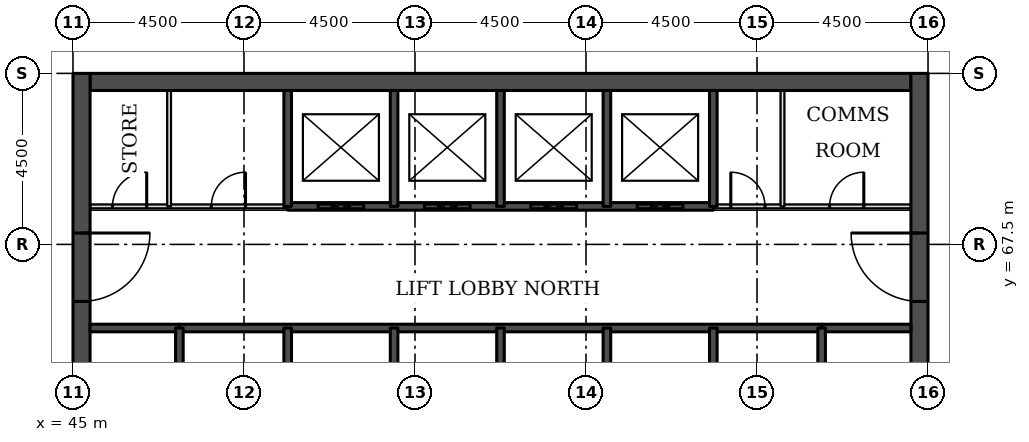
"""IFC4 building model, lengths in metres.
Left out: names, types, materials, properties, quantities, classifications, styles, units other than length and angle.
Written with IfcOpenShell. Run it as: python <this file> out.ifc"""

import sys

from ifc_helpers import new_model, si_unit, direction, frame, frame_2d, origin, place, context, subcontext, project, spatial, rectangle, extrude, element, fill, save


model = new_model("IFC4")
c1 = context("Model", 3, precision=1e-05, world=origin(), true_north=direction((0.0, 1.0)))
c2 = subcontext(c1, "Body", "Model", "MODEL_VIEW")
j1 = project(units=[si_unit("LENGTHUNIT", "METRE"), si_unit("PLANEANGLEUNIT", "RADIAN")], contexts=[c1])
p1 = place(None, origin())
s1 = spatial("IfcSite", under=j1, at=p1, CompositionType="ELEMENT")
p2 = place(p1, origin())
s2 = spatial("IfcBuilding", under=s1, at=p2, CompositionType="ELEMENT")
p3 = place(p2, frame((0.0, 0.0, 97.4)))
s3 = spatial("IfcBuildingStorey", under=s2, at=p3, CompositionType="ELEMENT", Elevation=97.4)
p4 = place(p3, frame((45.45, 71.775, 0.0), z_axis=(0.0, 0.0, 1.0), x_axis=(1.0, 0.0, 0.0)))
e1 = element("IfcWall", 1, at=p4, inside=s3, PredefinedType="SHEAR", context=c2, shape_type="SweptSolid", body=[
    extrude(rectangle(XDim=21.6, YDim=0.45, at=frame_2d((10.8, 0.0))), origin(), (0.0, 0.0, 1.0), 3.7),
])
p5 = place(p3, frame((45.225, 49.5, 0.0), z_axis=(0.0, 0.0, 1.0), x_axis=(0.0, 1.0, 0.0)))
e2 = element("IfcWall", 2, at=p5, inside=s3, PredefinedType="SHEAR", context=c2, shape_type="SweptSolid", body=[
    extrude(rectangle(XDim=22.5, YDim=0.45, at=frame_2d((11.25, 0.0))), origin(), (0.0, 0.0, 1.0), 3.7),
])
p6 = place(p5, frame((4.2, 0.0, 0.0)))
e3 = element("IfcOpeningElement", 3, at=p6, cuts=e2, PredefinedType="OPENING", context=c2, shape_type="SweptSolid", body=[
    extrude(rectangle(XDim=1.8, YDim=2.1, at=frame_2d((0.9, 1.05))), frame((0.0, 0.235, 0.0), z_axis=(0.0, -1.0, 0.0), x_axis=(1.0, 0.0, 0.0)), (0.0, 0.0, 1.0), 0.47),
])
p7 = place(p5, frame((6.9, 0.0, 0.0)))
e4 = element("IfcOpeningElement", 4, at=p7, cuts=e2, PredefinedType="OPENING", context=c2, shape_type="SweptSolid", body=[
    extrude(rectangle(XDim=1.1, YDim=2.1, at=frame_2d((0.55, 1.05))), frame((0.0, 0.235, 0.0), z_axis=(0.0, -1.0, 0.0), x_axis=(1.0, 0.0, 0.0)), (0.0, 0.0, 1.0), 0.47),
])
p8 = place(p5, frame((13.6, 0.0, 0.0)))
e5 = element("IfcOpeningElement", 5, at=p8, cuts=e2, PredefinedType="OPENING", context=c2, shape_type="SweptSolid", body=[
    extrude(rectangle(XDim=1.1, YDim=2.1, at=frame_2d((0.55, 1.05))), frame((0.0, 0.235, 0.0), z_axis=(0.0, -1.0, 0.0), x_axis=(1.0, 0.0, 0.0)), (0.0, 0.0, 1.0), 0.47),
])
p9 = place(p5, frame((16.5, 0.0, 0.0)))
e6 = element("IfcOpeningElement", 6, at=p9, cuts=e2, PredefinedType="OPENING", context=c2, shape_type="SweptSolid", body=[
    extrude(rectangle(XDim=1.8, YDim=2.1, at=frame_2d((0.9, 1.05))), frame((0.0, 0.235, 0.0), z_axis=(0.0, -1.0, 0.0), x_axis=(1.0, 0.0, 0.0)), (0.0, 0.0, 1.0), 0.47),
])
p10 = place(p3, frame((67.275, 49.5, 0.0), z_axis=(0.0, 0.0, 1.0), x_axis=(0.0, 1.0, 0.0)))
e7 = element("IfcWall", 7, at=p10, inside=s3, PredefinedType="SHEAR", context=c2, shape_type="SweptSolid", body=[
    extrude(rectangle(XDim=22.5, YDim=0.45, at=frame_2d((11.25, 0.0))), origin(), (0.0, 0.0, 1.0), 3.7),
])
p11 = place(p10, frame((4.2, 0.0, 0.0)))
e8 = element("IfcOpeningElement", 8, at=p11, cuts=e7, PredefinedType="OPENING", context=c2, shape_type="SweptSolid", body=[
    extrude(rectangle(XDim=1.8, YDim=2.1, at=frame_2d((0.9, 1.05))), frame((0.0, 0.235, 0.0), z_axis=(0.0, -1.0, 0.0), x_axis=(1.0, 0.0, 0.0)), (0.0, 0.0, 1.0), 0.47),
])
p12 = place(p10, frame((6.9, 0.0, 0.0)))
e9 = element("IfcOpeningElement", 9, at=p12, cuts=e7, PredefinedType="OPENING", context=c2, shape_type="SweptSolid", body=[
    extrude(rectangle(XDim=1.1, YDim=2.1, at=frame_2d((0.55, 1.05))), frame((0.0, 0.235, 0.0), z_axis=(0.0, -1.0, 0.0), x_axis=(1.0, 0.0, 0.0)), (0.0, 0.0, 1.0), 0.47),
])
p13 = place(p10, frame((13.6, 0.0, 0.0)))
e10 = element("IfcOpeningElement", 10, at=p13, cuts=e7, PredefinedType="OPENING", context=c2, shape_type="SweptSolid", body=[
    extrude(rectangle(XDim=1.1, YDim=2.1, at=frame_2d((0.55, 1.05))), frame((0.0, 0.235, 0.0), z_axis=(0.0, -1.0, 0.0), x_axis=(1.0, 0.0, 0.0)), (0.0, 0.0, 1.0), 0.47),
])
p14 = place(p10, frame((16.5, 0.0, 0.0)))
e11 = element("IfcOpeningElement", 11, at=p14, cuts=e7, PredefinedType="OPENING", context=c2, shape_type="SweptSolid", body=[
    extrude(rectangle(XDim=1.8, YDim=2.1, at=frame_2d((0.9, 1.05))), frame((0.0, 0.235, 0.0), z_axis=(0.0, -1.0, 0.0), x_axis=(1.0, 0.0, 0.0)), (0.0, 0.0, 1.0), 0.47),
])
for number, where, z_axis, x_axis in (
    (12, (45.45, 65.3, 0.0), (0.0, 0.0, 1.0), (1.0, 0.0, 0.0)),
    (13, (64.7, 65.3, 0.0), (0.0, 0.0, 1.0), (1.0, 0.0, 0.0)),
):
    element("IfcWall", number, at=place(p3, frame(where, z_axis=z_axis, x_axis=x_axis)), inside=s3, PredefinedType="SOLIDWALL", context=c2, shape_type="SweptSolid", body=[
        extrude(rectangle(XDim=2.35, YDim=0.2, at=frame_2d((1.175, 0.0))), origin(), (0.0, 0.0, 1.0), 3.55),
    ])
p15 = place(p3, frame((47.8, 65.3, 0.0), z_axis=(0.0, 0.0, 1.0), x_axis=(1.0, 0.0, 0.0)))
e14 = element("IfcWall", 14, at=p15, inside=s3, PredefinedType="SOLIDWALL", context=c2, shape_type="SweptSolid", body=[
    extrude(rectangle(XDim=16.9, YDim=0.2, at=frame_2d((8.45, 0.0))), origin(), (0.0, 0.0, 1.0), 3.55),
])
p16 = place(p3, frame((45.45, 68.5, 0.0), z_axis=(0.0, 0.0, 1.0), x_axis=(1.0, 0.0, 0.0)))
e15 = element("IfcWall", 15, at=p16, inside=s3, PredefinedType="PARTITIONING", context=c2, shape_type="SweptSolid", body=[
    extrude(rectangle(XDim=5.2, YDim=0.1, at=frame_2d((2.6, 0.0))), origin(), (0.0, 0.0, 1.0), 3.55),
])
p17 = place(p16, frame((0.59, 0.0, 0.0)))
e16 = element("IfcOpeningElement", 16, at=p17, cuts=e15, PredefinedType="OPENING", context=c2, shape_type="SweptSolid", body=[
    extrude(rectangle(XDim=0.9, YDim=2.1, at=frame_2d((0.45, 1.05))), frame((0.0, 0.06, 0.0), z_axis=(0.0, -1.0, 0.0), x_axis=(1.0, 0.0, 0.0)), (0.0, 0.0, 1.0), 0.12),
])
p18 = place(p16, frame((3.19, 0.0, 0.0)))
e17 = element("IfcOpeningElement", 17, at=p18, cuts=e15, PredefinedType="OPENING", context=c2, shape_type="SweptSolid", body=[
    extrude(rectangle(XDim=0.9, YDim=2.1, at=frame_2d((0.45, 1.05))), frame((0.0, 0.06, 0.0), z_axis=(0.0, -1.0, 0.0), x_axis=(1.0, 0.0, 0.0)), (0.0, 0.0, 1.0), 0.12),
])
p19 = place(p3, frame((61.85, 68.5, 0.0), z_axis=(0.0, 0.0, 1.0), x_axis=(1.0, 0.0, 0.0)))
e18 = element("IfcWall", 18, at=p19, inside=s3, PredefinedType="PARTITIONING", context=c2, shape_type="SweptSolid", body=[
    extrude(rectangle(XDim=5.2, YDim=0.1, at=frame_2d((2.6, 0.0))), origin(), (0.0, 0.0, 1.0), 3.55),
])
p20 = place(p19, frame((3.06, 0.0, 0.0)))
e19 = element("IfcOpeningElement", 19, at=p20, cuts=e18, PredefinedType="OPENING", context=c2, shape_type="SweptSolid", body=[
    extrude(rectangle(XDim=0.9, YDim=2.1, at=frame_2d((0.45, 1.05))), frame((0.0, 0.06, 0.0), z_axis=(0.0, -1.0, 0.0), x_axis=(1.0, 0.0, 0.0)), (0.0, 0.0, 1.0), 0.12),
])
p21 = place(p19, frame((0.46, 0.0, 0.0)))
e20 = element("IfcOpeningElement", 20, at=p21, cuts=e18, PredefinedType="OPENING", context=c2, shape_type="SweptSolid", body=[
    extrude(rectangle(XDim=0.9, YDim=2.1, at=frame_2d((0.45, 1.05))), frame((0.0, 0.06, 0.0), z_axis=(0.0, -1.0, 0.0), x_axis=(1.0, 0.0, 0.0)), (0.0, 0.0, 1.0), 0.12),
])
p22 = place(p3, frame((50.65, 68.5, 0.0), z_axis=(0.0, 0.0, 1.0), x_axis=(1.0, 0.0, 0.0)))
e21 = element("IfcWall", 21, at=p22, inside=s3, PredefinedType="SOLIDWALL", context=c2, shape_type="SweptSolid", body=[
    extrude(rectangle(XDim=11.2, YDim=0.2, at=frame_2d((5.6, 0.0))), origin(), (0.0, 0.0, 1.0), 3.55),
])
p23 = place(p22, frame((0.8, 0.0, 0.0)))
e22 = element("IfcOpeningElement", 22, at=p23, cuts=e21, PredefinedType="OPENING", context=c2, shape_type="SweptSolid", body=[
    extrude(rectangle(XDim=1.2, YDim=2.1, at=frame_2d((0.6, 1.05))), frame((0.0, 0.11, 0.0), z_axis=(0.0, -1.0, 0.0), x_axis=(1.0, 0.0, 0.0)), (0.0, 0.0, 1.0), 0.22),
])
p24 = place(p22, frame((3.6, 0.0, 0.0)))
e23 = element("IfcOpeningElement", 23, at=p24, cuts=e21, PredefinedType="OPENING", context=c2, shape_type="SweptSolid", body=[
    extrude(rectangle(XDim=1.2, YDim=2.1, at=frame_2d((0.6, 1.05))), frame((0.0, 0.11, 0.0), z_axis=(0.0, -1.0, 0.0), x_axis=(1.0, 0.0, 0.0)), (0.0, 0.0, 1.0), 0.22),
])
p25 = place(p22, frame((6.4, 0.0, 0.0)))
e24 = element("IfcOpeningElement", 24, at=p25, cuts=e21, PredefinedType="OPENING", context=c2, shape_type="SweptSolid", body=[
    extrude(rectangle(XDim=1.2, YDim=2.1, at=frame_2d((0.6, 1.05))), frame((0.0, 0.11, 0.0), z_axis=(0.0, -1.0, 0.0), x_axis=(1.0, 0.0, 0.0)), (0.0, 0.0, 1.0), 0.22),
])
p26 = place(p22, frame((9.2, 0.0, 0.0)))
e25 = element("IfcOpeningElement", 25, at=p26, cuts=e21, PredefinedType="OPENING", context=c2, shape_type="SweptSolid", body=[
    extrude(rectangle(XDim=1.2, YDim=2.1, at=frame_2d((0.6, 1.05))), frame((0.0, 0.11, 0.0), z_axis=(0.0, -1.0, 0.0), x_axis=(1.0, 0.0, 0.0)), (0.0, 0.0, 1.0), 0.22),
])
p27 = place(p3, frame((47.53, 68.5, 0.0), z_axis=(0.0, 0.0, 1.0), x_axis=(0.0, 1.0, 0.0)))
e26 = element("IfcWall", 26, at=p27, inside=s3, PredefinedType="PARTITIONING", context=c2, shape_type="SweptSolid", body=[
    extrude(rectangle(XDim=3.05, YDim=0.1, at=frame_2d((1.525, 0.0))), origin(), (0.0, 0.0, 1.0), 3.55),
])
p28 = place(p3, frame((47.8, 62.0, 0.0), z_axis=(0.0, 0.0, 1.0), x_axis=(0.0, 1.0, 0.0)))
e27 = element("IfcWall", 27, at=p28, inside=s3, PredefinedType="SOLIDWALL", context=c2, shape_type="SweptSolid", body=[
    extrude(rectangle(XDim=3.3, YDim=0.2, at=frame_2d((1.65, 0.0))), origin(), (0.0, 0.0, 1.0), 3.55),
])
p29 = place(p28, frame((1.1, 0.0, 0.0)))
e28 = element("IfcOpeningElement", 28, at=p29, cuts=e27, PredefinedType="OPENING", context=c2, shape_type="SweptSolid", body=[
    extrude(rectangle(XDim=1.1, YDim=2.1, at=frame_2d((0.55, 1.05))), frame((0.0, 0.11, 0.0), z_axis=(0.0, -1.0, 0.0), x_axis=(1.0, 0.0, 0.0)), (0.0, 0.0, 1.0), 0.22),
])
p30 = place(p3, frame((50.65, 62.0, 0.0), z_axis=(0.0, 0.0, 1.0), x_axis=(0.0, 1.0, 0.0)))
e29 = element("IfcWall", 29, at=p30, inside=s3, PredefinedType="SOLIDWALL", context=c2, shape_type="SweptSolid", body=[
    extrude(rectangle(XDim=3.3, YDim=0.2, at=frame_2d((1.65, 0.0))), origin(), (0.0, 0.0, 1.0), 3.55),
])
p31 = place(p3, frame((50.65, 68.5, 0.0), z_axis=(0.0, 0.0, 1.0), x_axis=(0.0, 1.0, 0.0)))
e30 = element("IfcWall", 30, at=p31, inside=s3, PredefinedType="SOLIDWALL", context=c2, shape_type="SweptSolid", body=[
    extrude(rectangle(XDim=3.05, YDim=0.2, at=frame_2d((1.525, 0.0))), origin(), (0.0, 0.0, 1.0), 3.55),
])
p32 = place(p3, frame((53.45, 62.5, 0.0), z_axis=(0.0, 0.0, 1.0), x_axis=(0.0, 1.0, 0.0)))
e31 = element("IfcWall", 31, at=p32, inside=s3, PredefinedType="SOLIDWALL", context=c2, shape_type="SweptSolid", body=[
    extrude(rectangle(XDim=2.8, YDim=0.2, at=frame_2d((1.4, 0.0))), origin(), (0.0, 0.0, 1.0), 3.55),
])
p33 = place(p3, frame((53.45, 68.5, 0.0), z_axis=(0.0, 0.0, 1.0), x_axis=(0.0, 1.0, 0.0)))
e32 = element("IfcWall", 32, at=p33, inside=s3, PredefinedType="SOLIDWALL", context=c2, shape_type="SweptSolid", body=[
    extrude(rectangle(XDim=3.05, YDim=0.2, at=frame_2d((1.525, 0.0))), origin(), (0.0, 0.0, 1.0), 3.55),
])
p34 = place(p3, frame((56.25, 62.5, 0.0), z_axis=(0.0, 0.0, 1.0), x_axis=(0.0, 1.0, 0.0)))
e33 = element("IfcWall", 33, at=p34, inside=s3, PredefinedType="SOLIDWALL", context=c2, shape_type="SweptSolid", body=[
    extrude(rectangle(XDim=2.8, YDim=0.2, at=frame_2d((1.4, 0.0))), origin(), (0.0, 0.0, 1.0), 3.55),
])
p35 = place(p3, frame((56.25, 68.5, 0.0), z_axis=(0.0, 0.0, 1.0), x_axis=(0.0, 1.0, 0.0)))
e34 = element("IfcWall", 34, at=p35, inside=s3, PredefinedType="SOLIDWALL", context=c2, shape_type="SweptSolid", body=[
    extrude(rectangle(XDim=3.05, YDim=0.2, at=frame_2d((1.525, 0.0))), origin(), (0.0, 0.0, 1.0), 3.55),
])
p36 = place(p3, frame((59.05, 62.5, 0.0), z_axis=(0.0, 0.0, 1.0), x_axis=(0.0, 1.0, 0.0)))
e35 = element("IfcWall", 35, at=p36, inside=s3, PredefinedType="SOLIDWALL", context=c2, shape_type="SweptSolid", body=[
    extrude(rectangle(XDim=2.8, YDim=0.2, at=frame_2d((1.4, 0.0))), origin(), (0.0, 0.0, 1.0), 3.55),
])
p37 = place(p3, frame((59.05, 68.5, 0.0), z_axis=(0.0, 0.0, 1.0), x_axis=(0.0, 1.0, 0.0)))
e36 = element("IfcWall", 36, at=p37, inside=s3, PredefinedType="SOLIDWALL", context=c2, shape_type="SweptSolid", body=[
    extrude(rectangle(XDim=3.05, YDim=0.2, at=frame_2d((1.525, 0.0))), origin(), (0.0, 0.0, 1.0), 3.55),
])
p38 = place(p3, frame((61.85, 62.0, 0.0), z_axis=(0.0, 0.0, 1.0), x_axis=(0.0, 1.0, 0.0)))
e37 = element("IfcWall", 37, at=p38, inside=s3, PredefinedType="SOLIDWALL", context=c2, shape_type="SweptSolid", body=[
    extrude(rectangle(XDim=3.3, YDim=0.2, at=frame_2d((1.65, 0.0))), origin(), (0.0, 0.0, 1.0), 3.55),
])
p39 = place(p3, frame((61.85, 68.5, 0.0), z_axis=(0.0, 0.0, 1.0), x_axis=(0.0, 1.0, 0.0)))
e38 = element("IfcWall", 38, at=p39, inside=s3, PredefinedType="SOLIDWALL", context=c2, shape_type="SweptSolid", body=[
    extrude(rectangle(XDim=3.05, YDim=0.2, at=frame_2d((1.525, 0.0))), origin(), (0.0, 0.0, 1.0), 3.55),
])
p40 = place(p3, frame((63.67, 68.5, 0.0), z_axis=(0.0, 0.0, 1.0), x_axis=(0.0, 1.0, 0.0)))
e39 = element("IfcWall", 39, at=p40, inside=s3, PredefinedType="PARTITIONING", context=c2, shape_type="SweptSolid", body=[
    extrude(rectangle(XDim=3.05, YDim=0.1, at=frame_2d((1.525, 0.0))), origin(), (0.0, 0.0, 1.0), 3.55),
])
p41 = place(p3, frame((64.7, 62.0, 0.0), z_axis=(0.0, 0.0, 1.0), x_axis=(0.0, 1.0, 0.0)))
e40 = element("IfcWall", 40, at=p41, inside=s3, PredefinedType="SOLIDWALL", context=c2, shape_type="SweptSolid", body=[
    extrude(rectangle(XDim=3.3, YDim=0.2, at=frame_2d((1.65, 0.0))), origin(), (0.0, 0.0, 1.0), 3.55),
])
p42 = place(p41, frame((1.1, 0.0, 0.0)))
e41 = element("IfcOpeningElement", 41, at=p42, cuts=e40, PredefinedType="OPENING", context=c2, shape_type="SweptSolid", body=[
    extrude(rectangle(XDim=1.1, YDim=2.1, at=frame_2d((0.55, 1.05))), frame((0.0, 0.11, 0.0), z_axis=(0.0, -1.0, 0.0), x_axis=(1.0, 0.0, 0.0)), (0.0, 0.0, 1.0), 0.22),
])
p43 = place(p23, origin())
e42 = element("IfcDoor", 42, at=p43, inside=s3, OperationType="DOUBLE_DOOR_SLIDING", PredefinedType="DOOR", context=c2, shape_type="SweptSolid", body=[
    extrude(rectangle(XDim=1.2, YDim=2.1, at=frame_2d((0.6, 1.05))), frame((0.0, 0.025, 0.0), z_axis=(0.0, -1.0, 0.0), x_axis=(1.0, 0.0, 0.0)), (0.0, 0.0, 1.0), 0.05),
])
fill(e22, e42)
p44 = place(p24, origin())
e43 = element("IfcDoor", 43, at=p44, inside=s3, OperationType="DOUBLE_DOOR_SLIDING", PredefinedType="DOOR", context=c2, shape_type="SweptSolid", body=[
    extrude(rectangle(XDim=1.2, YDim=2.1, at=frame_2d((0.6, 1.05))), frame((0.0, 0.025, 0.0), z_axis=(0.0, -1.0, 0.0), x_axis=(1.0, 0.0, 0.0)), (0.0, 0.0, 1.0), 0.05),
])
fill(e23, e43)
p45 = place(p25, origin())
e44 = element("IfcDoor", 44, at=p45, inside=s3, OperationType="DOUBLE_DOOR_SLIDING", PredefinedType="DOOR", context=c2, shape_type="SweptSolid", body=[
    extrude(rectangle(XDim=1.2, YDim=2.1, at=frame_2d((0.6, 1.05))), frame((0.0, 0.025, 0.0), z_axis=(0.0, -1.0, 0.0), x_axis=(1.0, 0.0, 0.0)), (0.0, 0.0, 1.0), 0.05),
])
fill(e24, e44)
p46 = place(p26, origin())
e45 = element("IfcDoor", 45, at=p46, inside=s3, OperationType="DOUBLE_DOOR_SLIDING", PredefinedType="DOOR", context=c2, shape_type="SweptSolid", body=[
    extrude(rectangle(XDim=1.2, YDim=2.1, at=frame_2d((0.6, 1.05))), frame((0.0, 0.025, 0.0), z_axis=(0.0, -1.0, 0.0), x_axis=(1.0, 0.0, 0.0)), (0.0, 0.0, 1.0), 0.05),
])
fill(e25, e45)
p47 = place(p9, frame((1.8, 0.0, 0.0), z_axis=(0.0, 0.0, 1.0), x_axis=(-1.0, 0.0, 0.0)))
e46 = element("IfcDoor", 46, at=p47, inside=s3, OperationType="SINGLE_SWING_LEFT", PredefinedType="DOOR", context=c2, shape_type="SweptSolid", body=[
    extrude(rectangle(XDim=1.8, YDim=2.1, at=frame_2d((0.9, 1.05))), frame((0.0, 0.025, 0.0), z_axis=(0.0, -1.0, 0.0), x_axis=(1.0, 0.0, 0.0)), (0.0, 0.0, 1.0), 0.05),
])
fill(e6, e46)
p48 = place(p14, origin())
e47 = element("IfcDoor", 47, at=p48, inside=s3, OperationType="SINGLE_SWING_RIGHT", PredefinedType="DOOR", context=c2, shape_type="SweptSolid", body=[
    extrude(rectangle(XDim=1.8, YDim=2.1, at=frame_2d((0.9, 1.05))), frame((0.0, 0.025, 0.0), z_axis=(0.0, -1.0, 0.0), x_axis=(1.0, 0.0, 0.0)), (0.0, 0.0, 1.0), 0.05),
])
fill(e11, e47)
p49 = place(p20, origin())
e48 = element("IfcDoor", 48, at=p49, inside=s3, OperationType="SINGLE_SWING_RIGHT", PredefinedType="DOOR", context=c2, shape_type="SweptSolid", body=[
    extrude(rectangle(XDim=0.9, YDim=2.1, at=frame_2d((0.45, 1.05))), frame((0.0, 0.025, 0.0), z_axis=(0.0, -1.0, 0.0), x_axis=(1.0, 0.0, 0.0)), (0.0, 0.0, 1.0), 0.05),
])
fill(e19, e48)
p50 = place(p21, origin())
e49 = element("IfcDoor", 49, at=p50, inside=s3, OperationType="SINGLE_SWING_LEFT", PredefinedType="DOOR", context=c2, shape_type="SweptSolid", body=[
    extrude(rectangle(XDim=0.9, YDim=2.1, at=frame_2d((0.45, 1.05))), frame((0.0, 0.025, 0.0), z_axis=(0.0, -1.0, 0.0), x_axis=(1.0, 0.0, 0.0)), (0.0, 0.0, 1.0), 0.05),
])
fill(e20, e49)
p51 = place(p17, origin())
e50 = element("IfcDoor", 50, at=p51, inside=s3, OperationType="SINGLE_SWING_RIGHT", PredefinedType="DOOR", context=c2, shape_type="SweptSolid", body=[
    extrude(rectangle(XDim=0.9, YDim=2.1, at=frame_2d((0.45, 1.05))), frame((0.0, 0.025, 0.0), z_axis=(0.0, -1.0, 0.0), x_axis=(1.0, 0.0, 0.0)), (0.0, 0.0, 1.0), 0.05),
])
fill(e16, e50)
p52 = place(p18, origin())
e51 = element("IfcDoor", 51, at=p52, inside=s3, OperationType="SINGLE_SWING_RIGHT", PredefinedType="DOOR", context=c2, shape_type="SweptSolid", body=[
    extrude(rectangle(XDim=0.9, YDim=2.1, at=frame_2d((0.45, 1.05))), frame((0.0, 0.025, 0.0), z_axis=(0.0, -1.0, 0.0), x_axis=(1.0, 0.0, 0.0)), (0.0, 0.0, 1.0), 0.05),
])
fill(e17, e51)
save(model, sys.argv[1])
